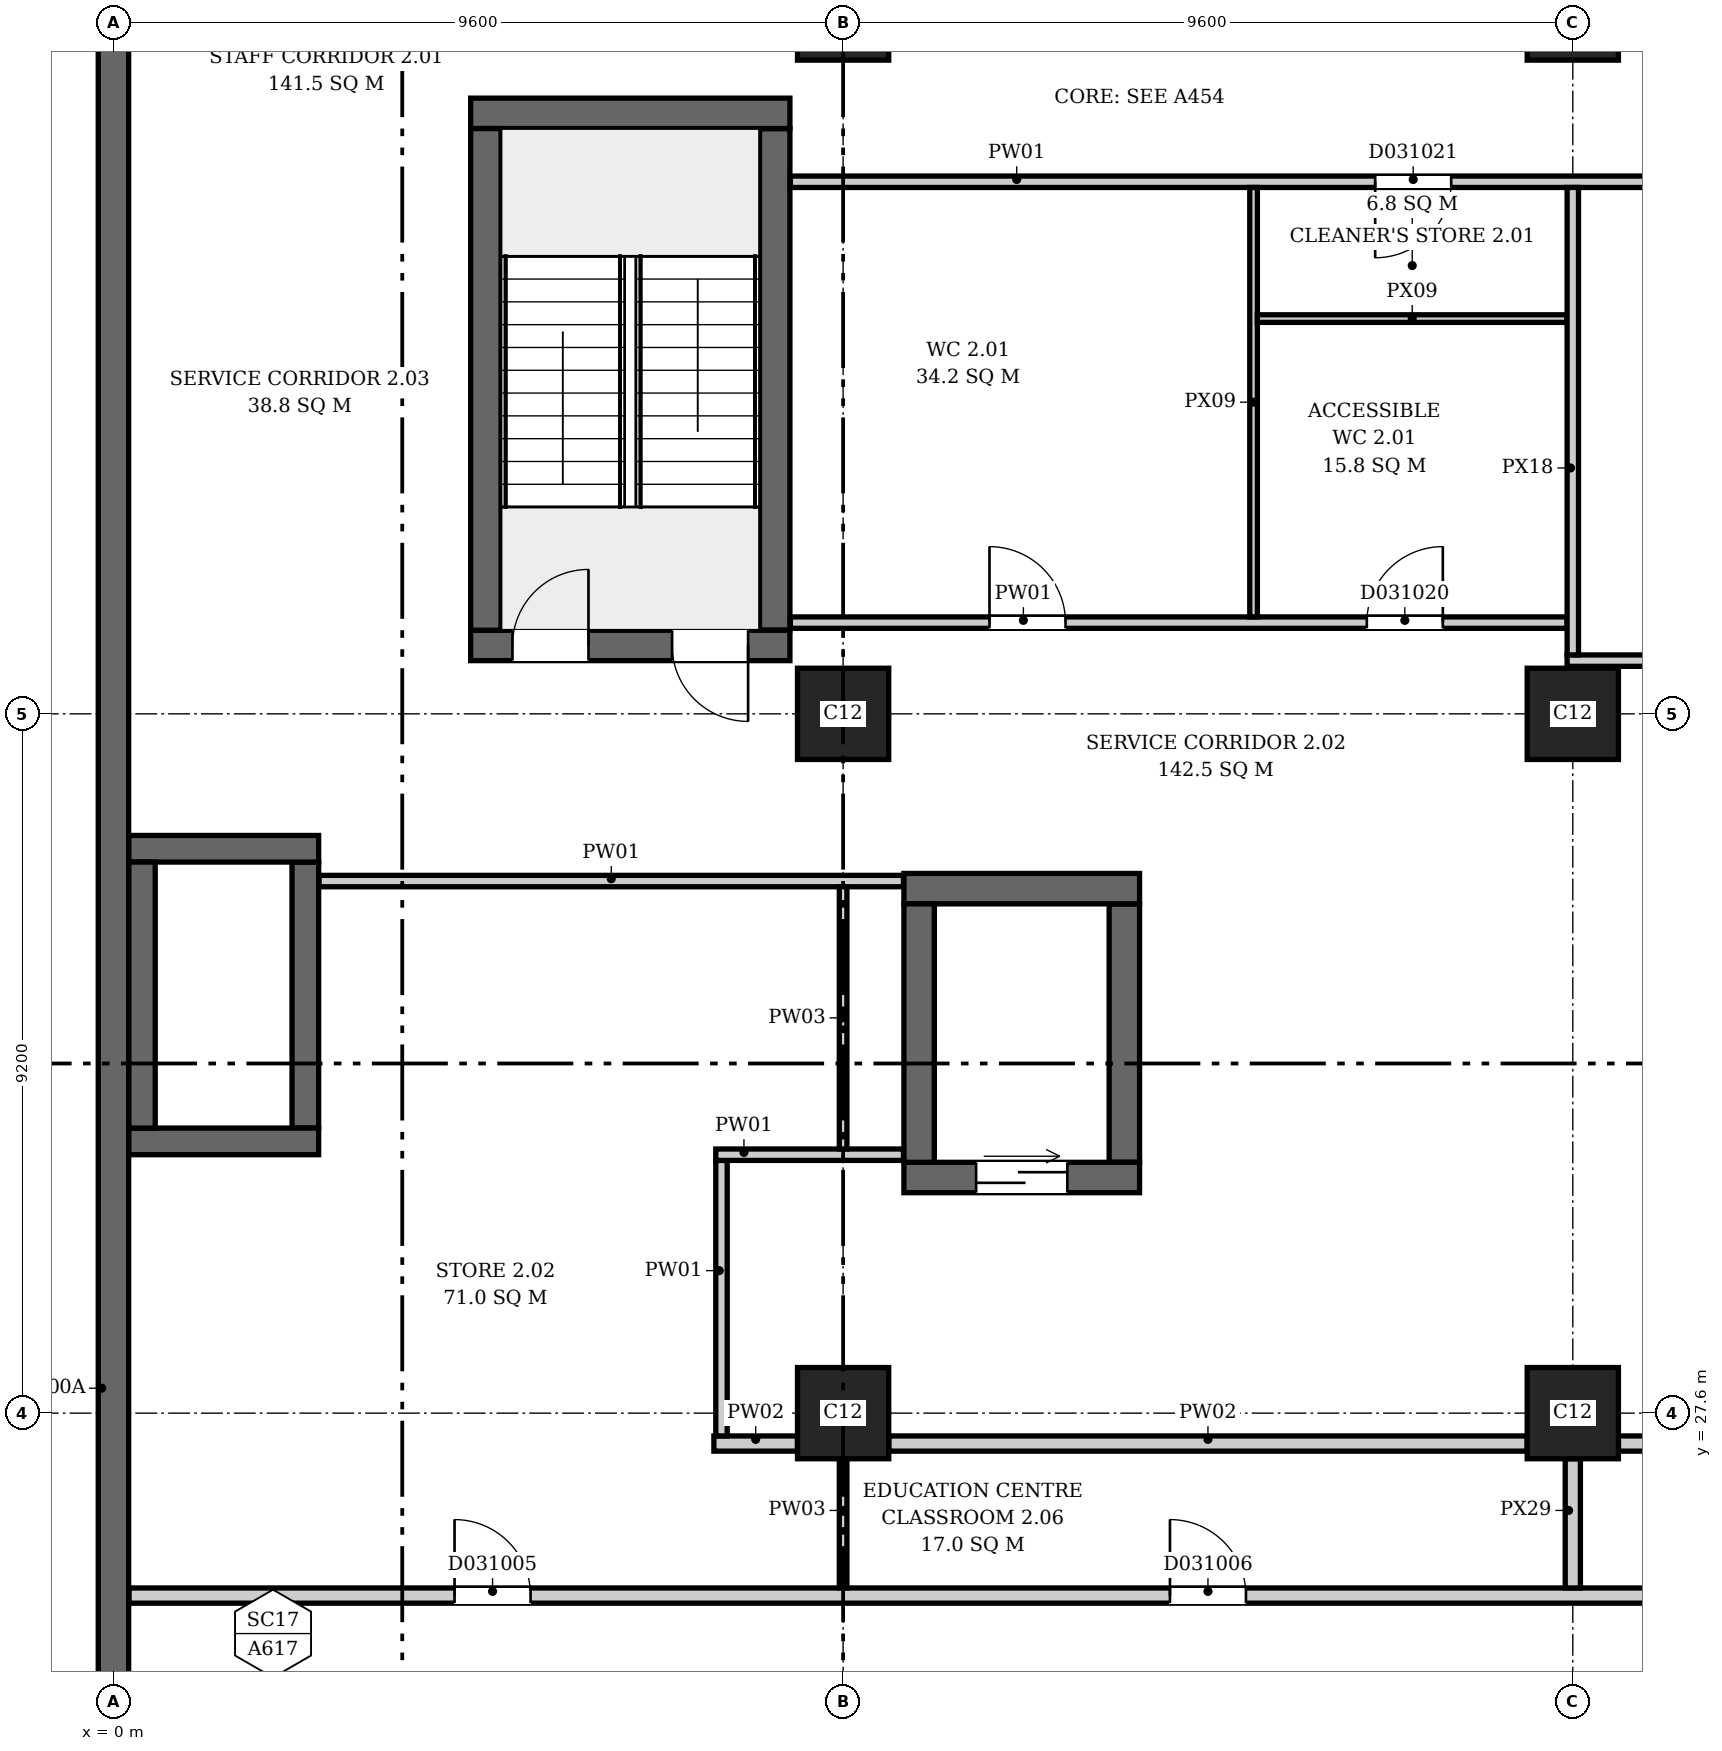
"""IFC4 building model, lengths in metres.
Left out: names, types, materials, properties, quantities, classifications, styles, units other than length and angle.
Written with IfcOpenShell. Run it as: python <this file> out.ifc"""

import sys

from ifc_helpers import new_model, si_unit, direction, frame, frame_2d, origin, origin_2d, place, context, subcontext, project, spatial, rectangle, extrude, element, fill, save


model = new_model("IFC4")
c1 = context("Model", 3, precision=1e-05, world=origin(), true_north=direction((0.0, 1.0)))
c2 = subcontext(c1, "Body", "Model", "MODEL_VIEW")
j1 = project(units=[si_unit("LENGTHUNIT", "METRE"), si_unit("PLANEANGLEUNIT", "RADIAN")], contexts=[c1])
p1 = place(None, origin())
s1 = spatial("IfcSite", under=j1, at=p1, CompositionType="ELEMENT")
p2 = place(p1, origin())
s2 = spatial("IfcBuilding", under=s1, at=p2, CompositionType="ELEMENT")
p3 = place(p2, frame((0.0, 0.0, 14.2)))
s3 = spatial("IfcBuildingStorey", under=s2, at=p3, CompositionType="ELEMENT", Elevation=14.2)
p4 = place(p3, frame((0.0, -0.2, 0.0), z_axis=(0.0, 0.0, 1.0), x_axis=(0.0, 1.0, 0.0)))
e1 = element("IfcWall", 1, at=p4, inside=s3, PredefinedType="SHEAR", context=c2, shape_type="SweptSolid", body=[
    extrude(rectangle(XDim=46.88, YDim=0.4, at=frame_2d((23.44, 0.0))), origin(), (0.0, 0.0, 1.0), 7.5),
])
p5 = place(p3, frame((4.7, 37.7, 0.0), z_axis=(0.0, 0.0, 1.0), x_axis=(1.0, 0.0, 0.0)))
e2 = element("IfcWall", 2, at=p5, inside=s3, PredefinedType="SHEAR", context=c2, shape_type="SweptSolid", body=[
    extrude(rectangle(XDim=4.2, YDim=0.4, at=frame_2d((2.1, 0.0))), origin(), (0.0, 0.0, 1.0), 7.5),
])
p6 = place(p5, frame((0.55, 0.0, 0.0)))
e3 = element("IfcOpeningElement", 3, at=p6, cuts=e2, PredefinedType="OPENING", context=c2, shape_type="SweptSolid", body=[
    extrude(rectangle(XDim=1.0, YDim=2.1, at=frame_2d((0.5, 1.05))), frame((0.0, 0.21, 0.0), z_axis=(0.0, -1.0, 0.0), x_axis=(1.0, 0.0, 0.0)), (0.0, 0.0, 1.0), 0.42),
])
p7 = place(p5, frame((2.65, 0.0, 0.0)))
e4 = element("IfcOpeningElement", 4, at=p7, cuts=e2, PredefinedType="OPENING", context=c2, shape_type="SweptSolid", body=[
    extrude(rectangle(XDim=1.0, YDim=2.1, at=frame_2d((0.5, 1.05))), frame((0.0, 0.21, 0.0), z_axis=(0.0, -1.0, 0.0), x_axis=(1.0, 0.0, 0.0)), (0.0, 0.0, 1.0), 0.42),
])
p8 = place(p3, frame((4.7, 44.7, 0.0), z_axis=(0.0, 0.0, 1.0), x_axis=(1.0, 0.0, 0.0)))
e5 = element("IfcWall", 5, at=p8, inside=s3, PredefinedType="SHEAR", context=c2, shape_type="SweptSolid", body=[
    extrude(rectangle(XDim=4.2, YDim=0.4, at=frame_2d((2.1, 0.0))), origin(), (0.0, 0.0, 1.0), 7.5),
])
for number, where, z_axis, x_axis in (
    (6, (4.9, 37.9, 0.0), (0.0, 0.0, 1.0), (0.0, 1.0, 0.0)),
    (7, (8.7, 37.9, 0.0), (0.0, 0.0, 1.0), (0.0, 1.0, 0.0)),
):
    element("IfcWall", number, at=place(p3, frame(where, z_axis=z_axis, x_axis=x_axis)), inside=s3, PredefinedType="SHEAR", context=c2, shape_type="SweptSolid", body=[
        extrude(rectangle(XDim=6.6, YDim=0.4, at=frame_2d((3.3, 0.0))), origin(), (0.0, 0.0, 1.0), 7.5),
    ])
for number, where, z_axis, x_axis in (
    (8, (0.2, 31.175, 0.0), (0.0, 0.0, 1.0), (1.0, 0.0, 0.0)),
    (9, (0.2, 35.025, 0.0), (0.0, 0.0, 1.0), (1.0, 0.0, 0.0)),
):
    element("IfcWall", number, at=place(p3, frame(where, z_axis=z_axis, x_axis=x_axis)), inside=s3, PredefinedType="SHEAR", context=c2, shape_type="SweptSolid", body=[
        extrude(rectangle(XDim=2.5, YDim=0.35, at=frame_2d((1.25, 0.0))), origin(), (0.0, 0.0, 1.0), 7.5),
    ])
for number, where, z_axis, x_axis in (
    (10, (0.375, 31.35, 0.0), (0.0, 0.0, 1.0), (0.0, 1.0, 0.0)),
    (11, (2.525, 31.35, 0.0), (0.0, 0.0, 1.0), (0.0, 1.0, 0.0)),
):
    element("IfcWall", number, at=place(p3, frame(where, z_axis=z_axis, x_axis=x_axis)), inside=s3, PredefinedType="SHEAR", context=c2, shape_type="SweptSolid", body=[
        extrude(rectangle(XDim=3.5, YDim=0.35, at=frame_2d((1.75, 0.0))), origin(), (0.0, 0.0, 1.0), 7.5),
    ])
p9 = place(p3, frame((10.4, 30.7, 0.0), z_axis=(0.0, 0.0, 1.0), x_axis=(1.0, 0.0, 0.0)))
e12 = element("IfcWall", 12, at=p9, inside=s3, PredefinedType="SHEAR", context=c2, shape_type="SweptSolid", body=[
    extrude(rectangle(XDim=3.1, YDim=0.4, at=frame_2d((1.55, 0.0))), origin(), (0.0, 0.0, 1.0), 7.5),
])
p10 = place(p9, frame((0.95, 0.0, 0.0)))
e13 = element("IfcOpeningElement", 13, at=p10, cuts=e12, PredefinedType="OPENING", context=c2, shape_type="SweptSolid", body=[
    extrude(rectangle(XDim=1.2, YDim=2.1, at=frame_2d((0.6, 1.05))), frame((0.0, 0.21, 0.0), z_axis=(0.0, -1.0, 0.0), x_axis=(1.0, 0.0, 0.0)), (0.0, 0.0, 1.0), 0.42),
])
p11 = place(p3, frame((10.4, 34.5, 0.0), z_axis=(0.0, 0.0, 1.0), x_axis=(1.0, 0.0, 0.0)))
e14 = element("IfcWall", 14, at=p11, inside=s3, PredefinedType="SHEAR", context=c2, shape_type="SweptSolid", body=[
    extrude(rectangle(XDim=3.1, YDim=0.4, at=frame_2d((1.55, 0.0))), origin(), (0.0, 0.0, 1.0), 7.5),
])
for number, where, z_axis, x_axis in (
    (15, (10.6, 30.9, 0.0), (0.0, 0.0, 1.0), (0.0, 1.0, 0.0)),
    (16, (13.3, 30.9, 0.0), (0.0, 0.0, 1.0), (0.0, 1.0, 0.0)),
):
    element("IfcWall", number, at=place(p3, frame(where, z_axis=z_axis, x_axis=x_axis)), inside=s3, PredefinedType="SHEAR", context=c2, shape_type="SweptSolid", body=[
        extrude(rectangle(XDim=3.4, YDim=0.4, at=frame_2d((1.7, 0.0))), origin(), (0.0, 0.0, 1.0), 7.5),
    ])
for number, where, z_axis, x_axis in (
    (17, (9.6, 27.6, 0.0), (0.0, 0.0, 1.0), (1.0, 0.0, 0.0)),
    (18, (19.2, 27.6, 0.0), (0.0, 0.0, 1.0), (1.0, 0.0, 0.0)),
    (19, (9.6, 36.8, 0.0), (0.0, 0.0, 1.0), (1.0, 0.0, 0.0)),
    (20, (19.2, 36.8, 0.0), (0.0, 0.0, 1.0), (1.0, 0.0, 0.0)),
    (21, (9.6, 46.0, 0.0), (0.0, 0.0, 1.0), (1.0, 0.0, 0.0)),
    (22, (19.2, 46.0, 0.0), (0.0, 0.0, 1.0), (1.0, 0.0, 0.0)),
):
    element("IfcColumn", number, at=place(p3, frame(where, z_axis=z_axis, x_axis=x_axis)), inside=s3, PredefinedType="COLUMN", context=c2, shape_type="SweptSolid", body=[
        extrude(rectangle(XDim=1.2, YDim=1.2, at=origin_2d()), origin(), (0.0, 0.0, 1.0), 7.5),
    ])
p12 = place(p3, frame((0.206, 25.2, 0.0), z_axis=(0.0, 0.0, 1.0), x_axis=(1.0, 0.0, 0.0)))
e23 = element("IfcWall", 23, at=p12, inside=s3, PredefinedType="PARTITIONING", context=c2, shape_type="SweptSolid", body=[
    extrude(rectangle(XDim=54.488, YDim=0.2, at=frame_2d((27.244, 0.0))), origin(), (0.0, 0.0, 1.0), 7.15),
])
p13 = place(p12, frame((4.282, 0.0, 0.0)))
e24 = element("IfcOpeningElement", 24, at=p13, cuts=e23, PredefinedType="OPENING", context=c2, shape_type="SweptSolid", body=[
    extrude(rectangle(XDim=1.0, YDim=2.1, at=frame_2d((0.5, 1.05))), frame((0.0, 0.11, 0.0), z_axis=(0.0, -1.0, 0.0), x_axis=(1.0, 0.0, 0.0)), (0.0, 0.0, 1.0), 0.22),
])
p14 = place(p12, frame((13.694, 0.0, 0.0)))
e25 = element("IfcOpeningElement", 25, at=p14, cuts=e23, PredefinedType="OPENING", context=c2, shape_type="SweptSolid", body=[
    extrude(rectangle(XDim=1.0, YDim=2.1, at=frame_2d((0.5, 1.05))), frame((0.0, 0.11, 0.0), z_axis=(0.0, -1.0, 0.0), x_axis=(1.0, 0.0, 0.0)), (0.0, 0.0, 1.0), 0.22),
])
p15 = place(p12, frame((23.294, 0.0, 0.0)))
e26 = element("IfcOpeningElement", 26, at=p15, cuts=e23, PredefinedType="OPENING", context=c2, shape_type="SweptSolid", body=[
    extrude(rectangle(XDim=1.0, YDim=2.1, at=frame_2d((0.5, 1.05))), frame((0.0, 0.11, 0.0), z_axis=(0.0, -1.0, 0.0), x_axis=(1.0, 0.0, 0.0)), (0.0, 0.0, 1.0), 0.22),
])
p16 = place(p12, frame((32.894, 0.0, 0.0)))
e27 = element("IfcOpeningElement", 27, at=p16, cuts=e23, PredefinedType="OPENING", context=c2, shape_type="SweptSolid", body=[
    extrude(rectangle(XDim=1.0, YDim=2.1, at=frame_2d((0.5, 1.05))), frame((0.0, 0.11, 0.0), z_axis=(0.0, -1.0, 0.0), x_axis=(1.0, 0.0, 0.0)), (0.0, 0.0, 1.0), 0.22),
])
p17 = place(p12, frame((42.494, 0.0, 0.0)))
e28 = element("IfcOpeningElement", 28, at=p17, cuts=e23, PredefinedType="OPENING", context=c2, shape_type="SweptSolid", body=[
    extrude(rectangle(XDim=1.0, YDim=2.1, at=frame_2d((0.5, 1.05))), frame((0.0, 0.11, 0.0), z_axis=(0.0, -1.0, 0.0), x_axis=(1.0, 0.0, 0.0)), (0.0, 0.0, 1.0), 0.22),
])
p18 = place(p12, frame((50.556, 0.0, 0.0)))
e29 = element("IfcOpeningElement", 29, at=p18, cuts=e23, PredefinedType="OPENING", context=c2, shape_type="SweptSolid", body=[
    extrude(rectangle(XDim=1.0, YDim=2.1, at=frame_2d((0.5, 1.05))), frame((0.0, 0.11, 0.0), z_axis=(0.0, -1.0, 0.0), x_axis=(1.0, 0.0, 0.0)), (0.0, 0.0, 1.0), 0.22),
])
p19 = place(p3, frame((2.706, 34.6, 0.0), z_axis=(0.0, 0.0, 1.0), x_axis=(1.0, 0.0, 0.0)))
e30 = element("IfcWall", 30, at=p19, inside=s3, PredefinedType="PARTITIONING", context=c2, shape_type="SweptSolid", body=[
    extrude(rectangle(XDim=7.688, YDim=0.15, at=frame_2d((3.844, 0.0))), origin(), (0.0, 0.0, 1.0), 7.15),
])
p20 = place(p3, frame((7.9, 27.2, 0.0), z_axis=(0.0, 0.0, 1.0), x_axis=(1.0, 0.0, 0.0)))
e31 = element("IfcWall", 31, at=p20, inside=s3, PredefinedType="PARTITIONING", context=c2, shape_type="SweptSolid", body=[
    extrude(rectangle(XDim=1.1, YDim=0.2, at=frame_2d((0.55, 0.0))), origin(), (0.0, 0.0, 1.0), 7.15),
])
p21 = place(p3, frame((8.0, 27.3, 0.0), z_axis=(0.0, 0.0, 1.0), x_axis=(0.0, 1.0, 0.0)))
e32 = element("IfcWall", 32, at=p21, inside=s3, PredefinedType="PARTITIONING", context=c2, shape_type="SweptSolid", body=[
    extrude(rectangle(XDim=3.625, YDim=0.15, at=frame_2d((1.812, 0.0))), origin(), (0.0, 0.0, 1.0), 7.15),
])
p22 = place(p3, frame((7.925, 31.0, 0.0), z_axis=(0.0, 0.0, 1.0), x_axis=(1.0, 0.0, 0.0)))
e33 = element("IfcWall", 33, at=p22, inside=s3, PredefinedType="PARTITIONING", context=c2, shape_type="SweptSolid", body=[
    extrude(rectangle(XDim=2.469, YDim=0.15, at=frame_2d((1.234, 0.0))), origin(), (0.0, 0.0, 1.0), 7.15),
])
p23 = place(p3, frame((8.906, 38.0, 0.0), z_axis=(0.0, 0.0, 1.0), x_axis=(1.0, 0.0, 0.0)))
e34 = element("IfcWall", 34, at=p23, inside=s3, PredefinedType="PARTITIONING", context=c2, shape_type="SweptSolid", body=[
    extrude(rectangle(XDim=10.219, YDim=0.15, at=frame_2d((5.109, 0.0))), origin(), (0.0, 0.0, 1.0), 7.15),
])
p24 = place(p23, frame((2.62, 0.0, 0.0)))
e35 = element("IfcOpeningElement", 35, at=p24, cuts=e34, PredefinedType="OPENING", context=c2, shape_type="SweptSolid", body=[
    extrude(rectangle(XDim=1.0, YDim=2.1, at=frame_2d((0.5, 1.05))), frame((0.0, 0.085, 0.0), z_axis=(0.0, -1.0, 0.0), x_axis=(1.0, 0.0, 0.0)), (0.0, 0.0, 1.0), 0.17),
])
p25 = place(p23, frame((7.584, 0.0, 0.0)))
e36 = element("IfcOpeningElement", 36, at=p25, cuts=e34, PredefinedType="OPENING", context=c2, shape_type="SweptSolid", body=[
    extrude(rectangle(XDim=1.0, YDim=2.1, at=frame_2d((0.5, 1.05))), frame((0.0, 0.085, 0.0), z_axis=(0.0, -1.0, 0.0), x_axis=(1.0, 0.0, 0.0)), (0.0, 0.0, 1.0), 0.17),
])
p26 = place(p3, frame((8.906, 43.8, 0.0), z_axis=(0.0, 0.0, 1.0), x_axis=(1.0, 0.0, 0.0)))
e37 = element("IfcWall", 37, at=p26, inside=s3, PredefinedType="PARTITIONING", context=c2, shape_type="SweptSolid", body=[
    extrude(rectangle(XDim=14.888, YDim=0.15, at=frame_2d((7.444, 0.0))), origin(), (0.0, 0.0, 1.0), 7.15),
])
p27 = place(p26, frame((7.694, 0.0, 0.0)))
e38 = element("IfcOpeningElement", 38, at=p27, cuts=e37, PredefinedType="OPENING", context=c2, shape_type="SweptSolid", body=[
    extrude(rectangle(XDim=1.0, YDim=2.1, at=frame_2d((0.5, 1.05))), frame((0.0, 0.085, 0.0), z_axis=(0.0, -1.0, 0.0), x_axis=(1.0, 0.0, 0.0)), (0.0, 0.0, 1.0), 0.17),
])
p28 = place(p3, frame((9.6, 25.3, 0.0), z_axis=(0.0, 0.0, 1.0), x_axis=(0.0, 1.0, 0.0)))
e39 = element("IfcWall", 39, at=p28, inside=s3, PredefinedType="PARTITIONING", context=c2, shape_type="SweptSolid", body=[
    extrude(rectangle(XDim=1.7, YDim=0.1, at=frame_2d((0.85, 0.0))), origin(), (0.0, 0.0, 1.0), 6.75),
])
p29 = place(p3, frame((9.6, 31.075, 0.0), z_axis=(0.0, 0.0, 1.0), x_axis=(0.0, 1.0, 0.0)))
e40 = element("IfcWall", 40, at=p29, inside=s3, PredefinedType="PARTITIONING", context=c2, shape_type="SweptSolid", body=[
    extrude(rectangle(XDim=3.45, YDim=0.1, at=frame_2d((1.725, 0.0))), origin(), (0.0, 0.0, 1.0), 6.75),
])
p30 = place(p3, frame((10.2, 27.2, 0.0), z_axis=(0.0, 0.0, 1.0), x_axis=(1.0, 0.0, 0.0)))
e41 = element("IfcWall", 41, at=p30, inside=s3, PredefinedType="PARTITIONING", context=c2, shape_type="SweptSolid", body=[
    extrude(rectangle(XDim=8.4, YDim=0.2, at=frame_2d((4.2, 0.0))), origin(), (0.0, 0.0, 1.0), 7.15),
])
p31 = place(p3, frame((15.0, 38.075, 0.0), z_axis=(0.0, 0.0, 1.0), x_axis=(0.0, 1.0, 0.0)))
e42 = element("IfcWall", 42, at=p31, inside=s3, PredefinedType="PARTITIONING", context=c2, shape_type="SweptSolid", body=[
    extrude(rectangle(XDim=5.65, YDim=0.1, at=frame_2d((2.825, 0.0))), origin(), (0.0, 0.0, 1.0), 7.15),
])
p32 = place(p3, frame((15.05, 42.0, 0.0), z_axis=(0.0, 0.0, 1.0), x_axis=(1.0, 0.0, 0.0)))
e43 = element("IfcWall", 43, at=p32, inside=s3, PredefinedType="PARTITIONING", context=c2, shape_type="SweptSolid", body=[
    extrude(rectangle(XDim=4.075, YDim=0.1, at=frame_2d((2.038, 0.0))), origin(), (0.0, 0.0, 1.0), 7.15),
])
p33 = place(p3, frame((19.2, 25.3, 0.0), z_axis=(0.0, 0.0, 1.0), x_axis=(0.0, 1.0, 0.0)))
e44 = element("IfcWall", 44, at=p33, inside=s3, PredefinedType="PARTITIONING", context=c2, shape_type="SweptSolid", body=[
    extrude(rectangle(XDim=1.7, YDim=0.2, at=frame_2d((0.85, 0.0))), origin(), (0.0, 0.0, 1.0), 6.75),
])
p34 = place(p3, frame((19.125, 37.5, 0.0), z_axis=(0.0, 0.0, 1.0), x_axis=(1.0, 0.0, 0.0)))
e45 = element("IfcWall", 45, at=p34, inside=s3, PredefinedType="PARTITIONING", context=c2, shape_type="SweptSolid", body=[
    extrude(rectangle(XDim=4.669, YDim=0.15, at=frame_2d((2.334, 0.0))), origin(), (0.0, 0.0, 1.0), 7.15),
])
p35 = place(p34, frame((1.834, 0.0, 0.0)))
e46 = element("IfcOpeningElement", 46, at=p35, cuts=e45, PredefinedType="OPENING", context=c2, shape_type="SweptSolid", body=[
    extrude(rectangle(XDim=1.0, YDim=2.1, at=frame_2d((0.5, 1.05))), frame((0.0, 0.085, 0.0), z_axis=(0.0, -1.0, 0.0), x_axis=(1.0, 0.0, 0.0)), (0.0, 0.0, 1.0), 0.17),
])
p36 = place(p3, frame((19.2, 37.575, 0.0), z_axis=(0.0, 0.0, 1.0), x_axis=(0.0, 1.0, 0.0)))
e47 = element("IfcWall", 47, at=p36, inside=s3, PredefinedType="PARTITIONING", context=c2, shape_type="SweptSolid", body=[
    extrude(rectangle(XDim=6.15, YDim=0.15, at=frame_2d((3.075, 0.0))), origin(), (0.0, 0.0, 1.0), 6.75),
])
p37 = place(p3, frame((19.8, 27.2, 0.0), z_axis=(0.0, 0.0, 1.0), x_axis=(1.0, 0.0, 0.0)))
e48 = element("IfcWall", 48, at=p37, inside=s3, PredefinedType="PARTITIONING", context=c2, shape_type="SweptSolid", body=[
    extrude(rectangle(XDim=8.4, YDim=0.2, at=frame_2d((4.2, 0.0))), origin(), (0.0, 0.0, 1.0), 7.15),
])
p38 = place(p6, origin())
e49 = element("IfcDoor", 49, at=p38, inside=s3, OperationType="SINGLE_SWING_RIGHT", PredefinedType="DOOR", context=c2, shape_type="SweptSolid", body=[
    extrude(rectangle(XDim=1.0, YDim=2.1, at=frame_2d((0.5, 1.05))), frame((0.0, 0.025, 0.0), z_axis=(0.0, -1.0, 0.0), x_axis=(1.0, 0.0, 0.0)), (0.0, 0.0, 1.0), 0.05),
])
fill(e3, e49)
p39 = place(p7, origin())
e50 = element("IfcDoor", 50, at=p39, inside=s3, OperationType="SINGLE_SWING_LEFT", PredefinedType="DOOR", context=c2, shape_type="SweptSolid", body=[
    extrude(rectangle(XDim=1.0, YDim=2.1, at=frame_2d((0.5, 1.05))), frame((0.0, 0.025, 0.0), z_axis=(0.0, -1.0, 0.0), x_axis=(1.0, 0.0, 0.0)), (0.0, 0.0, 1.0), 0.05),
])
fill(e4, e50)
p40 = place(p10, origin())
e51 = element("IfcDoor", 51, at=p40, inside=s3, OperationType="DOUBLE_DOOR_SLIDING", PredefinedType="DOOR", context=c2, shape_type="SweptSolid", body=[
    extrude(rectangle(XDim=1.2, YDim=2.1, at=frame_2d((0.6, 1.05))), frame((0.0, 0.025, 0.0), z_axis=(0.0, -1.0, 0.0), x_axis=(1.0, 0.0, 0.0)), (0.0, 0.0, 1.0), 0.05),
])
fill(e13, e51)
p41 = place(p13, origin())
e52 = element("IfcDoor", 52, at=p41, inside=s3, OperationType="SINGLE_SWING_LEFT", PredefinedType="DOOR", context=c2, shape_type="SweptSolid", body=[
    extrude(rectangle(XDim=1.0, YDim=2.1, at=frame_2d((0.5, 1.05))), frame((0.0, 0.025, 0.0), z_axis=(0.0, -1.0, 0.0), x_axis=(1.0, 0.0, 0.0)), (0.0, 0.0, 1.0), 0.05),
])
fill(e24, e52)
p42 = place(p14, origin())
e53 = element("IfcDoor", 53, at=p42, inside=s3, OperationType="SINGLE_SWING_LEFT", PredefinedType="DOOR", context=c2, shape_type="SweptSolid", body=[
    extrude(rectangle(XDim=1.0, YDim=2.1, at=frame_2d((0.5, 1.05))), frame((0.0, 0.025, 0.0), z_axis=(0.0, -1.0, 0.0), x_axis=(1.0, 0.0, 0.0)), (0.0, 0.0, 1.0), 0.05),
])
fill(e25, e53)
p43 = place(p24, origin())
e54 = element("IfcDoor", 54, at=p43, inside=s3, OperationType="SINGLE_SWING_LEFT", PredefinedType="DOOR", context=c2, shape_type="SweptSolid", body=[
    extrude(rectangle(XDim=1.0, YDim=2.1, at=frame_2d((0.5, 1.05))), frame((0.0, 0.025, 0.0), z_axis=(0.0, -1.0, 0.0), x_axis=(1.0, 0.0, 0.0)), (0.0, 0.0, 1.0), 0.05),
])
fill(e35, e54)
p44 = place(p25, origin())
e55 = element("IfcDoor", 55, at=p44, inside=s3, OperationType="SINGLE_SWING_RIGHT", PredefinedType="DOOR", context=c2, shape_type="SweptSolid", body=[
    extrude(rectangle(XDim=1.0, YDim=2.1, at=frame_2d((0.5, 1.05))), frame((0.0, 0.025, 0.0), z_axis=(0.0, -1.0, 0.0), x_axis=(1.0, 0.0, 0.0)), (0.0, 0.0, 1.0), 0.05),
])
fill(e36, e55)
p45 = place(p27, origin())
e56 = element("IfcDoor", 56, at=p45, inside=s3, OperationType="SINGLE_SWING_LEFT", PredefinedType="DOOR", context=c2, shape_type="SweptSolid", body=[
    extrude(rectangle(XDim=1.0, YDim=2.1, at=frame_2d((0.5, 1.05))), frame((0.0, 0.025, 0.0), z_axis=(0.0, -1.0, 0.0), x_axis=(1.0, 0.0, 0.0)), (0.0, 0.0, 1.0), 0.05),
])
fill(e38, e56)
save(model, sys.argv[1])
